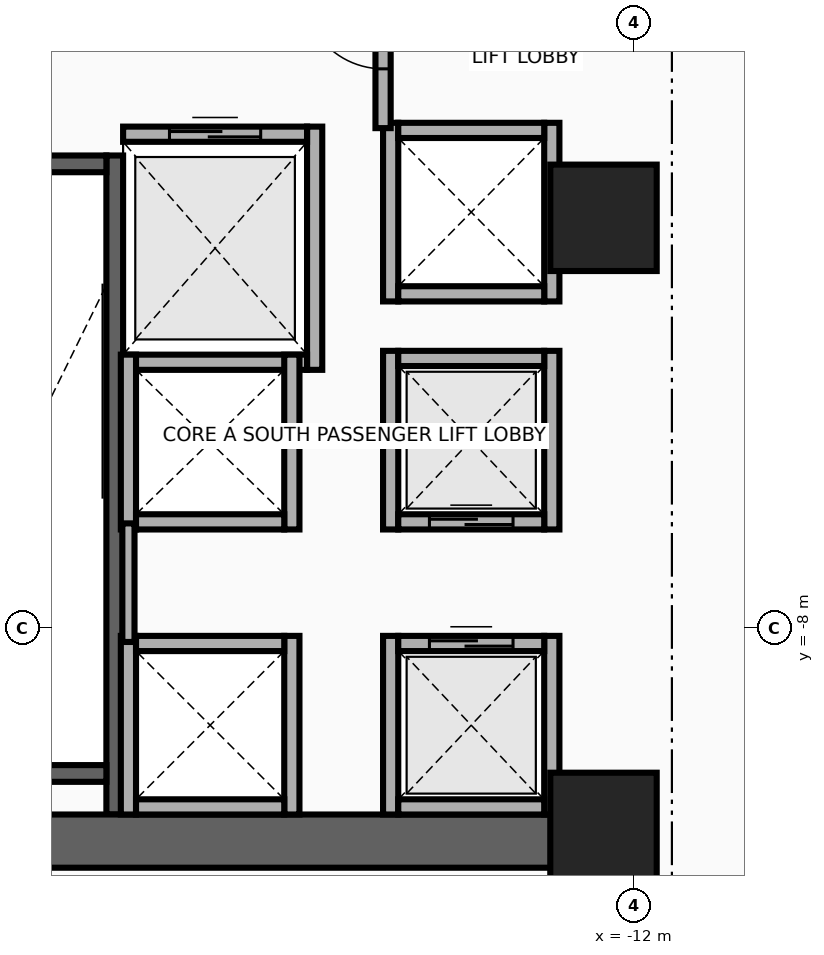
"""IFC4 building model, lengths in metres.
Left out: names, types, materials, properties, quantities, classifications, styles, units other than length and angle.
Written with IfcOpenShell. Run it as: python <this file> out.ifc"""

import sys

from ifc_helpers import new_model, si_unit, direction, frame, frame_2d, origin, origin_2d, place, context, subcontext, project, spatial, rectangle, extrude, source, transform, mapped, element, fill, save


model = new_model("IFC4")
c1 = context("Model", 3, precision=1e-05, world=origin(), true_north=direction((0.0, 1.0)))
c2 = subcontext(c1, "Body", "Model", "MODEL_VIEW")
j1 = project(units=[si_unit("LENGTHUNIT", "METRE"), si_unit("PLANEANGLEUNIT", "RADIAN")], contexts=[c1])
p1 = place(None, origin())
s1 = spatial("IfcSite", under=j1, at=p1, CompositionType="ELEMENT")
p2 = place(p1, origin())
s2 = spatial("IfcBuilding", under=s1, at=p2, CompositionType="ELEMENT")
p3 = place(p2, frame((0.0, 0.0, 51.9)))
s3 = spatial("IfcBuildingStorey", under=s2, at=p3, CompositionType="ELEMENT", Elevation=51.9)
p4 = place(p3, frame((-18.83, -10.45, 0.0), z_axis=(0.0, 0.0, 1.0), x_axis=(0.0, 1.0, 0.0)))
e1 = element("IfcWall", 1, at=p4, inside=s3, PredefinedType="SHEAR", context=c2, shape_type="SweptSolid", body=[
    extrude(rectangle(XDim=8.67, YDim=0.22, at=frame_2d((4.335, 0.0))), origin(), (0.0, 0.0, 1.0), 3.46),
])
p5 = place(p3, frame((-22.05, -9.91, 0.0), z_axis=(0.0, 0.0, 1.0), x_axis=(1.0, 0.0, 0.0)))
e2 = element("IfcWall", 2, at=p5, inside=s3, PredefinedType="SHEAR", context=c2, shape_type="SweptSolid", body=[
    extrude(rectangle(XDim=3.11, YDim=0.22, at=frame_2d((1.555, 0.0))), origin(), (0.0, 0.0, 1.0), 3.46),
])
p6 = place(p3, frame((-22.05, -1.89, 0.0), z_axis=(0.0, 0.0, 1.0), x_axis=(1.0, 0.0, 0.0)))
e3 = element("IfcWall", 3, at=p6, inside=s3, PredefinedType="SHEAR", context=c2, shape_type="SweptSolid", body=[
    extrude(rectangle(XDim=3.11, YDim=0.22, at=frame_2d((1.555, 0.0))), origin(), (0.0, 0.0, 1.0), 3.46),
])
p7 = place(p6, frame((1.0, 0.0, 0.0)))
e4 = element("IfcOpeningElement", 4, at=p7, cuts=e3, PredefinedType="OPENING", context=c2, shape_type="SweptSolid", body=[
    extrude(rectangle(XDim=1.1, YDim=2.15, at=frame_2d((0.55, 1.075))), frame((0.0, 0.125, 0.0), z_axis=(0.0, -1.0, 0.0), x_axis=(1.0, 0.0, 0.0)), (0.0, 0.0, 1.0), 0.25),
])
p8 = place(p3, frame((-22.65, -10.8, 0.0), z_axis=(0.0, 0.0, 1.0), x_axis=(1.0, 0.0, 0.0)))
e5 = element("IfcWall", 5, at=p8, inside=s3, PredefinedType="SHEAR", context=c2, shape_type="SweptSolid", body=[
    extrude(rectangle(XDim=10.25, YDim=0.7, at=frame_2d((5.125, 0.0))), origin(), (0.0, 0.0, 1.0), 3.46),
])
m1 = source(origin(), c2, "Body", "SweptSolid", [
    extrude(rectangle(XDim=1.4, YDim=1.4, at=origin_2d()), origin(), (0.0, 0.0, 1.0), 3.7),
])
for number, where, z_axis, x_axis in (
    (6, (-12.4, -10.6, 0.0), (0.0, 0.0, 1.0), (1.0, 0.0, 0.0)),
    (7, (-12.4, -2.6, 0.0), (0.0, 0.0, 1.0), (1.0, 0.0, 0.0)),
):
    element("IfcColumn", number, at=place(p3, frame(where, z_axis=z_axis, x_axis=x_axis)), inside=s3, PredefinedType="COLUMN", context=c2, shape_type="MappedRepresentation", body=[
        mapped(m1, transform((0.0, 0.0, 0.0), x_axis=(1.0, 0.0, 0.0), y_axis=(0.0, 1.0, 0.0), z_axis=(0.0, 0.0, 1.0), scale=1.0)),
    ])
p9 = place(p3, frame((-16.2, -4.6, 0.0), z_axis=(0.0, 0.0, 1.0), x_axis=(0.0, 1.0, 0.0)))
e8 = element("IfcWall", 8, at=p9, inside=s3, PredefinedType="MOVABLE", context=c2, shape_type="SweptSolid", body=[
    extrude(rectangle(XDim=3.2, YDim=0.2, at=frame_2d((1.6, 0.0))), origin(), (0.0, 0.0, 1.0), 3.46),
])
p10 = place(p3, frame((-18.72, -4.5, 0.0), z_axis=(0.0, 0.0, 1.0), x_axis=(1.0, 0.0, 0.0)))
e9 = element("IfcWall", 9, at=p10, inside=s3, PredefinedType="MOVABLE", context=c2, shape_type="SweptSolid", body=[
    extrude(rectangle(XDim=2.42, YDim=0.2, at=frame_2d((1.21, 0.0))), origin(), (0.0, 0.0, 1.0), 3.46),
])
p11 = place(p3, frame((-18.72, -1.5, 0.0), z_axis=(0.0, 0.0, 1.0), x_axis=(1.0, 0.0, 0.0)))
e10 = element("IfcWall", 10, at=p11, inside=s3, PredefinedType="MOVABLE", context=c2, shape_type="SweptSolid", body=[
    extrude(rectangle(XDim=2.42, YDim=0.2, at=frame_2d((1.21, 0.0))), origin(), (0.0, 0.0, 1.0), 3.46),
])
p12 = place(p11, frame((0.61, 0.0, 0.0)))
e11 = element("IfcOpeningElement", 11, at=p12, cuts=e10, PredefinedType="OPENING", context=c2, shape_type="SweptSolid", body=[
    extrude(rectangle(XDim=1.2, YDim=2.1, at=frame_2d((0.6, 1.05))), frame((0.0, 0.115, 0.0), z_axis=(0.0, -1.0, 0.0), x_axis=(1.0, 0.0, 0.0)), (0.0, 0.0, 1.0), 0.23),
])
for number, where, z_axis, x_axis in (
    (12, (-15.2, -10.45, 0.0), (0.0, 0.0, 1.0), (0.0, 1.0, 0.0)),
    (13, (-13.08, -10.45, 0.0), (0.0, 0.0, 1.0), (0.0, 1.0, 0.0)),
):
    element("IfcWall", number, at=place(p3, frame(where, z_axis=z_axis, x_axis=x_axis)), inside=s3, PredefinedType="MOVABLE", context=c2, shape_type="SweptSolid", body=[
        extrude(rectangle(XDim=2.35, YDim=0.2, at=frame_2d((1.175, 0.0))), origin(), (0.0, 0.0, 1.0), 2.583),
    ])
p13 = place(p3, frame((-15.1, -10.35, 0.0), z_axis=(0.0, 0.0, 1.0), x_axis=(1.0, 0.0, 0.0)))
e14 = element("IfcWall", 14, at=p13, inside=s3, PredefinedType="MOVABLE", context=c2, shape_type="SweptSolid", body=[
    extrude(rectangle(XDim=1.92, YDim=0.2, at=frame_2d((0.96, 0.0))), origin(), (0.0, 0.0, 1.0), 2.583),
])
p14 = place(p3, frame((-15.1, -8.2, 0.0), z_axis=(0.0, 0.0, 1.0), x_axis=(1.0, 0.0, 0.0)))
e15 = element("IfcWall", 15, at=p14, inside=s3, PredefinedType="MOVABLE", context=c2, shape_type="SweptSolid", body=[
    extrude(rectangle(XDim=1.92, YDim=0.2, at=frame_2d((0.96, 0.0))), origin(), (0.0, 0.0, 1.0), 3.46),
])
p15 = place(p14, frame((0.41, 0.0, 0.0)))
e16 = element("IfcOpeningElement", 16, at=p15, cuts=e15, PredefinedType="OPENING", context=c2, shape_type="SweptSolid", body=[
    extrude(rectangle(XDim=1.1, YDim=2.1, at=frame_2d((0.55, 1.05))), frame((0.0, 0.115, 0.0), z_axis=(0.0, -1.0, 0.0), x_axis=(1.0, 0.0, 0.0)), (0.0, 0.0, 1.0), 0.23),
])
for number, where, z_axis, x_axis in (
    (17, (-15.2, -6.7, 0.0), (0.0, 0.0, 1.0), (0.0, 1.0, 0.0)),
    (18, (-13.08, -6.7, 0.0), (0.0, 0.0, 1.0), (0.0, 1.0, 0.0)),
):
    element("IfcWall", number, at=place(p3, frame(where, z_axis=z_axis, x_axis=x_axis)), inside=s3, PredefinedType="MOVABLE", context=c2, shape_type="SweptSolid", body=[
        extrude(rectangle(XDim=2.35, YDim=0.2, at=frame_2d((1.175, 0.0))), origin(), (0.0, 0.0, 1.0), 3.46),
    ])
p16 = place(p3, frame((-15.1, -6.6, 0.0), z_axis=(0.0, 0.0, 1.0), x_axis=(1.0, 0.0, 0.0)))
e19 = element("IfcWall", 19, at=p16, inside=s3, PredefinedType="MOVABLE", context=c2, shape_type="SweptSolid", body=[
    extrude(rectangle(XDim=1.92, YDim=0.2, at=frame_2d((0.96, 0.0))), origin(), (0.0, 0.0, 1.0), 3.46),
])
p17 = place(p16, frame((0.41, 0.0, 0.0)))
e20 = element("IfcOpeningElement", 20, at=p17, cuts=e19, PredefinedType="OPENING", context=c2, shape_type="SweptSolid", body=[
    extrude(rectangle(XDim=1.1, YDim=2.1, at=frame_2d((0.55, 1.05))), frame((0.0, 0.115, 0.0), z_axis=(0.0, -1.0, 0.0), x_axis=(1.0, 0.0, 0.0)), (0.0, 0.0, 1.0), 0.23),
])
p18 = place(p3, frame((-15.1, -4.45, 0.0), z_axis=(0.0, 0.0, 1.0), x_axis=(1.0, 0.0, 0.0)))
e21 = element("IfcWall", 21, at=p18, inside=s3, PredefinedType="MOVABLE", context=c2, shape_type="SweptSolid", body=[
    extrude(rectangle(XDim=1.92, YDim=0.2, at=frame_2d((0.96, 0.0))), origin(), (0.0, 0.0, 1.0), 3.46),
])
for number, where, z_axis, x_axis in (
    (22, (-18.65, -10.45, 0.0), (0.0, 0.0, 1.0), (0.0, 1.0, 0.0)),
    (23, (-16.5, -10.45, 0.0), (0.0, 0.0, 1.0), (0.0, 1.0, 0.0)),
):
    element("IfcWall", number, at=place(p3, frame(where, z_axis=z_axis, x_axis=x_axis)), inside=s3, PredefinedType="MOVABLE", context=c2, shape_type="SweptSolid", body=[
        extrude(rectangle(XDim=2.35, YDim=0.2, at=frame_2d((1.175, 0.0))), origin(), (0.0, 0.0, 1.0), 2.583),
    ])
p19 = place(p3, frame((-18.55, -10.35, 0.0), z_axis=(0.0, 0.0, 1.0), x_axis=(1.0, 0.0, 0.0)))
e24 = element("IfcWall", 24, at=p19, inside=s3, PredefinedType="MOVABLE", context=c2, shape_type="SweptSolid", body=[
    extrude(rectangle(XDim=1.95, YDim=0.2, at=frame_2d((0.975, 0.0))), origin(), (0.0, 0.0, 1.0), 2.583),
])
p20 = place(p3, frame((-18.55, -8.2, 0.0), z_axis=(0.0, 0.0, 1.0), x_axis=(1.0, 0.0, 0.0)))
e25 = element("IfcWall", 25, at=p20, inside=s3, PredefinedType="MOVABLE", context=c2, shape_type="SweptSolid", body=[
    extrude(rectangle(XDim=1.95, YDim=0.2, at=frame_2d((0.975, 0.0))), origin(), (0.0, 0.0, 1.0), 3.46),
])
for number, where, z_axis, x_axis in (
    (26, (-18.65, -6.7, 0.0), (0.0, 0.0, 1.0), (0.0, 1.0, 0.0)),
    (27, (-16.5, -6.7, 0.0), (0.0, 0.0, 1.0), (0.0, 1.0, 0.0)),
):
    element("IfcWall", number, at=place(p3, frame(where, z_axis=z_axis, x_axis=x_axis)), inside=s3, PredefinedType="MOVABLE", context=c2, shape_type="SweptSolid", body=[
        extrude(rectangle(XDim=2.3, YDim=0.2, at=frame_2d((1.15, 0.0))), origin(), (0.0, 0.0, 1.0), 3.46),
    ])
p21 = place(p3, frame((-18.55, -6.6, 0.0), z_axis=(0.0, 0.0, 1.0), x_axis=(1.0, 0.0, 0.0)))
e28 = element("IfcWall", 28, at=p21, inside=s3, PredefinedType="MOVABLE", context=c2, shape_type="SweptSolid", body=[
    extrude(rectangle(XDim=1.95, YDim=0.2, at=frame_2d((0.975, 0.0))), origin(), (0.0, 0.0, 1.0), 3.46),
])
for number, where, z_axis, x_axis in (
    (29, (-15.2, -3.7, 0.0), (0.0, 0.0, 1.0), (0.0, 1.0, 0.0)),
    (30, (-13.08, -3.7, 0.0), (0.0, 0.0, 1.0), (0.0, 1.0, 0.0)),
):
    element("IfcWall", number, at=place(p3, frame(where, z_axis=z_axis, x_axis=x_axis)), inside=s3, PredefinedType="MOVABLE", context=c2, shape_type="SweptSolid", body=[
        extrude(rectangle(XDim=2.35, YDim=0.2, at=frame_2d((1.175, 0.0))), origin(), (0.0, 0.0, 1.0), 3.46),
    ])
for number, where, z_axis, x_axis in (
    (31, (-15.1, -3.6, 0.0), (0.0, 0.0, 1.0), (1.0, 0.0, 0.0)),
    (32, (-15.1, -1.45, 0.0), (0.0, 0.0, 1.0), (1.0, 0.0, 0.0)),
):
    element("IfcWall", number, at=place(p3, frame(where, z_axis=z_axis, x_axis=x_axis)), inside=s3, PredefinedType="MOVABLE", context=c2, shape_type="SweptSolid", body=[
        extrude(rectangle(XDim=1.92, YDim=0.2, at=frame_2d((0.96, 0.0))), origin(), (0.0, 0.0, 1.0), 3.46),
    ])
p22 = place(p3, frame((-15.3, -1.42, 0.0), z_axis=(0.0, 0.0, 1.0), x_axis=(0.0, 1.0, 0.0)))
e33 = element("IfcWall", 33, at=p22, inside=s3, PredefinedType="PARTITIONING", context=c2, shape_type="SweptSolid", body=[
    extrude(rectangle(XDim=2.67, YDim=0.2, at=frame_2d((1.335, 0.0))), origin(), (0.0, 0.0, 1.0), 3.46),
])
p23 = place(p22, frame((0.78, 0.0, 0.0)))
e34 = element("IfcOpeningElement", 34, at=p23, cuts=e33, PredefinedType="OPENING", context=c2, shape_type="SweptSolid", body=[
    extrude(rectangle(XDim=1.05, YDim=2.15, at=frame_2d((0.525, 1.075))), frame((0.0, 0.115, 0.0), z_axis=(0.0, -1.0, 0.0), x_axis=(1.0, 0.0, 0.0)), (0.0, 0.0, 1.0), 0.23),
])
p24 = place(p3, frame((-18.65, -8.18, 0.0), z_axis=(0.0, 0.0, 1.0), x_axis=(0.0, 1.0, 0.0)))
e35 = element("IfcWall", 35, at=p24, inside=s3, PredefinedType="PARTITIONING", context=c2, shape_type="SweptSolid", body=[
    extrude(rectangle(XDim=1.56, YDim=0.16, at=frame_2d((0.78, 0.0))), origin(), (0.0, 0.0, 1.0), 3.46),
])
p25 = place(p12, origin())
e36 = element("IfcDoor", 36, at=p25, inside=s3, OperationType="DOUBLE_DOOR_SLIDING", PredefinedType="DOOR", context=c2, shape_type="SweptSolid", body=[
    extrude(rectangle(XDim=1.2, YDim=2.1, at=frame_2d((0.6, 1.05))), frame((0.0, 0.025, 0.0), z_axis=(0.0, -1.0, 0.0), x_axis=(1.0, 0.0, 0.0)), (0.0, 0.0, 1.0), 0.05),
])
fill(e11, e36)
p26 = place(p15, origin())
e37 = element("IfcDoor", 37, at=p26, inside=s3, OperationType="DOUBLE_DOOR_SLIDING", PredefinedType="DOOR", context=c2, shape_type="SweptSolid", body=[
    extrude(rectangle(XDim=1.1, YDim=2.1, at=frame_2d((0.55, 1.05))), frame((0.0, 0.025, 0.0), z_axis=(0.0, -1.0, 0.0), x_axis=(1.0, 0.0, 0.0)), (0.0, 0.0, 1.0), 0.05),
])
fill(e16, e37)
p27 = place(p17, origin())
e38 = element("IfcDoor", 38, at=p27, inside=s3, OperationType="DOUBLE_DOOR_SLIDING", PredefinedType="DOOR", context=c2, shape_type="SweptSolid", body=[
    extrude(rectangle(XDim=1.1, YDim=2.1, at=frame_2d((0.55, 1.05))), frame((0.0, 0.025, 0.0), z_axis=(0.0, -1.0, 0.0), x_axis=(1.0, 0.0, 0.0)), (0.0, 0.0, 1.0), 0.05),
])
fill(e20, e38)
p28 = place(p23, origin())
e39 = element("IfcDoor", 39, at=p28, inside=s3, OperationType="SINGLE_SWING_RIGHT", PredefinedType="DOOR", context=c2, shape_type="SweptSolid", body=[
    extrude(rectangle(XDim=1.05, YDim=2.15, at=frame_2d((0.525, 1.075))), frame((0.0, 0.025, 0.0), z_axis=(0.0, -1.0, 0.0), x_axis=(1.0, 0.0, 0.0)), (0.0, 0.0, 1.0), 0.05),
])
fill(e34, e39)
save(model, sys.argv[1])
